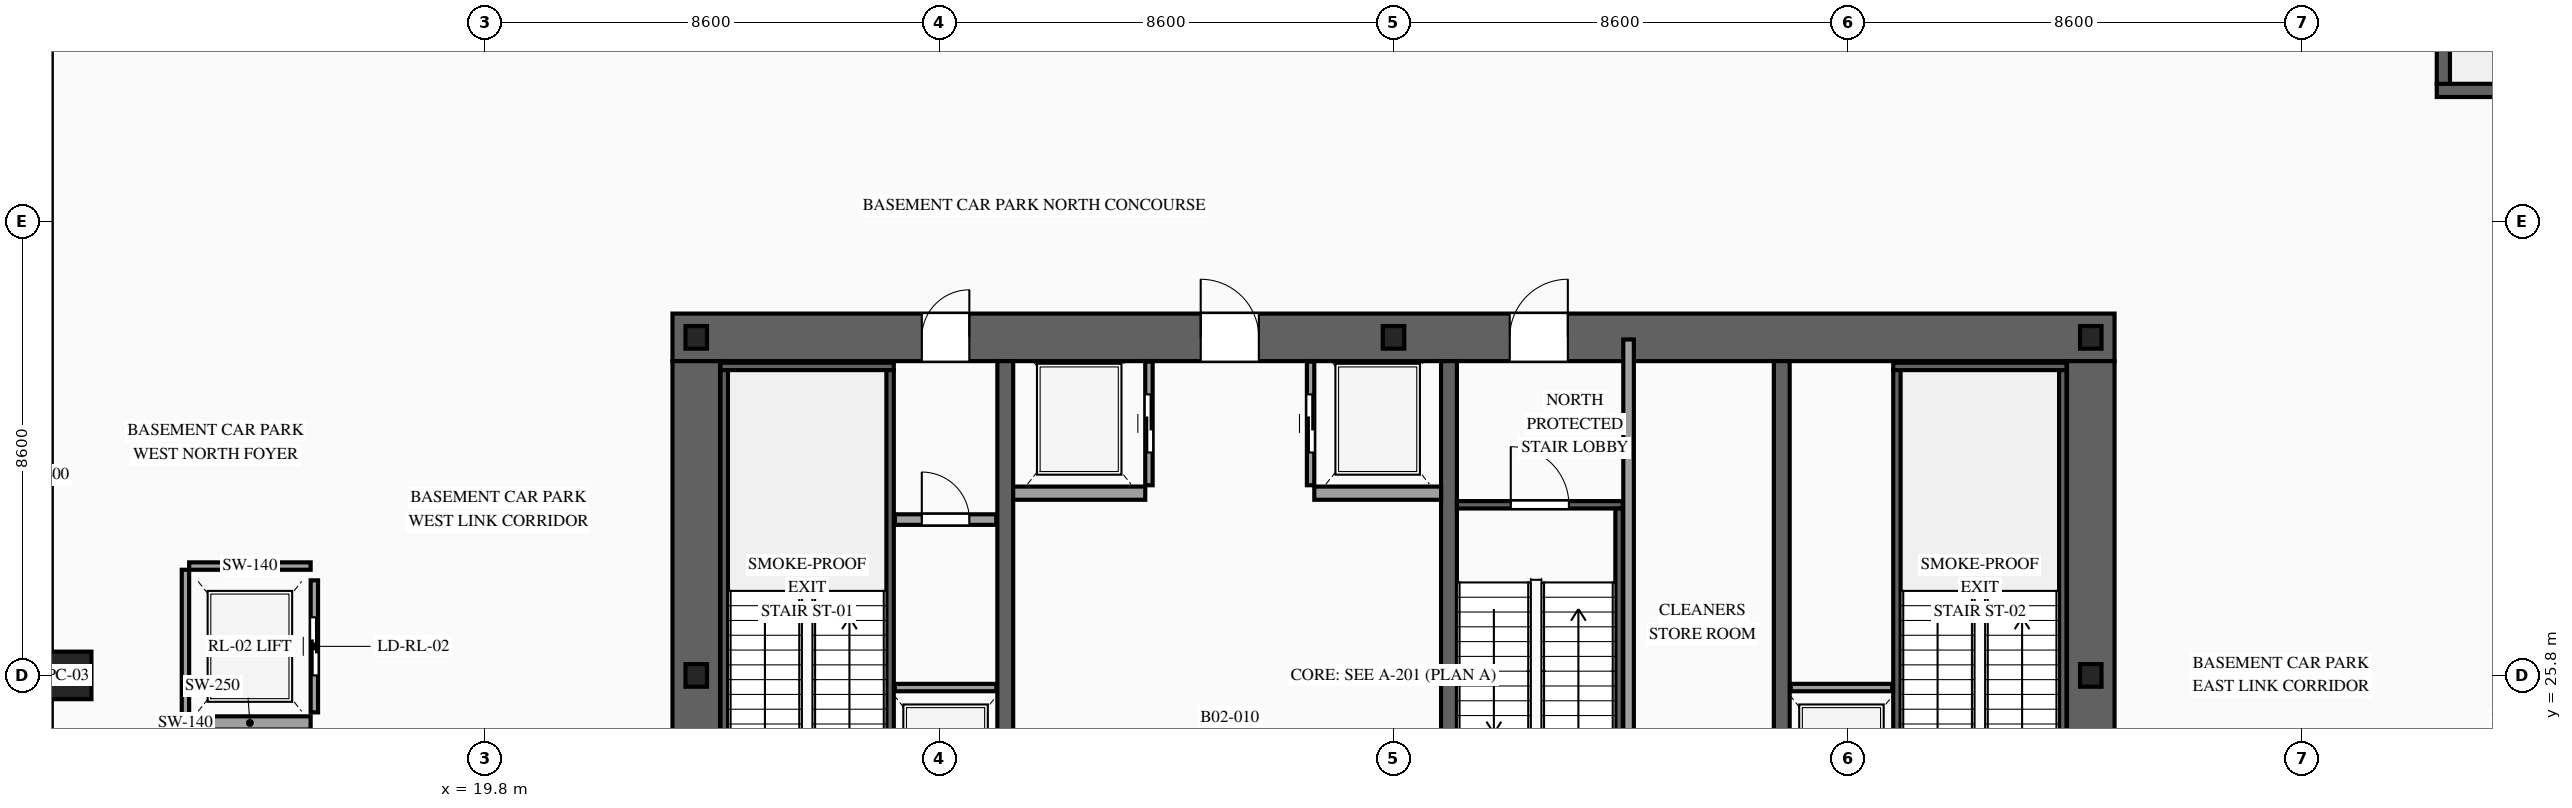
"""IFC4 building model, lengths in metres.
Left out: names, types, materials, properties, quantities, classifications, styles, units other than length and angle.
Written with IfcOpenShell. Run it as: python <this file> out.ifc"""

import sys

from ifc_helpers import new_model, si_unit, direction, frame, frame_2d, origin, origin_2d, place, context, subcontext, project, spatial, rectangle, i_section, extrude, source, transform, mapped, element, fill, save


model = new_model("IFC4")
c1 = context("Model", 3, precision=1e-05, world=origin(), true_north=direction((0.0, 1.0)))
c2 = subcontext(c1, "Body", "Model", "MODEL_VIEW")
j1 = project(units=[si_unit("LENGTHUNIT", "METRE"), si_unit("PLANEANGLEUNIT", "RADIAN")], contexts=[c1])
p1 = place(None, origin())
s1 = spatial("IfcSite", under=j1, at=p1, CompositionType="ELEMENT")
p2 = place(p1, origin())
s2 = spatial("IfcBuilding", under=s1, at=p2, CompositionType="ELEMENT")
p3 = place(p2, frame((0.0, 0.0, -9.0)))
s3 = spatial("IfcBuildingStorey", under=s2, at=p3, CompositionType="ELEMENT", Elevation=-9.0)
p4 = place(p3, frame((23.35, 32.2, 0.0), z_axis=(0.0, 0.0, 1.0), x_axis=(1.0, 0.0, 0.0)))
e1 = element("IfcWall", 1, at=p4, inside=s3, PredefinedType="SHEAR", context=c2, shape_type="SweptSolid", body=[
    extrude(rectangle(XDim=27.3, YDim=0.9, at=frame_2d((13.65, 0.0))), origin(), (0.0, 0.0, 1.0), 4.5),
])
p5 = place(p4, frame((4.72, 0.0, 0.0)))
e2 = element("IfcOpeningElement", 2, at=p5, cuts=e1, PredefinedType="OPENING", context=c2, shape_type="SweptSolid", body=[
    extrude(rectangle(XDim=0.9, YDim=2.15, at=frame_2d((0.45, 1.075))), frame((0.0, 0.465, 0.0), z_axis=(0.0, -1.0, 0.0), x_axis=(1.0, 0.0, 0.0)), (0.0, 0.0, 1.0), 0.93),
])
p6 = place(p4, frame((10.0, 0.0, 0.0)))
e3 = element("IfcOpeningElement", 3, at=p6, cuts=e1, PredefinedType="OPENING", context=c2, shape_type="SweptSolid", body=[
    extrude(rectangle(XDim=1.1, YDim=2.2, at=frame_2d((0.55, 1.1))), frame((0.0, 0.465, 0.0), z_axis=(0.0, -1.0, 0.0), x_axis=(1.0, 0.0, 0.0)), (0.0, 0.0, 1.0), 0.93),
])
p7 = place(p4, frame((15.85, 0.0, 0.0)))
e4 = element("IfcOpeningElement", 4, at=p7, cuts=e1, PredefinedType="OPENING", context=c2, shape_type="SweptSolid", body=[
    extrude(rectangle(XDim=1.1, YDim=2.2, at=frame_2d((0.55, 1.1))), frame((0.0, 0.465, 0.0), z_axis=(0.0, -1.0, 0.0), x_axis=(1.0, 0.0, 0.0)), (0.0, 0.0, 1.0), 0.93),
])
m1 = source(origin(), c2, "Body", "SweptSolid", [
    extrude(rectangle(XDim=11.9, YDim=0.9, at=frame_2d((5.95, 0.0))), origin(), (0.0, 0.0, 1.0), 4.5),
])
for number, where, z_axis, x_axis in (
    (5, (23.8, 19.85, 0.0), (0.0, 0.0, 1.0), (0.0, 1.0, 0.0)),
    (6, (50.2, 19.85, 0.0), (0.0, 0.0, 1.0), (0.0, 1.0, 0.0)),
):
    element("IfcWall", number, at=place(p3, frame(where, z_axis=z_axis, x_axis=x_axis)), inside=s3, PredefinedType="SHEAR", context=c2, shape_type="MappedRepresentation", body=[
        mapped(m1, transform((0.0, 0.0, 0.0), scale=1.0)),
    ])
m2 = source(origin(), c2, "Body", "SweptSolid", [
    extrude(rectangle(XDim=11.9, YDim=0.3, at=frame_2d((5.95, 0.0))), origin(), (0.0, 0.0, 1.0), 4.5),
])
for number, where, z_axis, x_axis in (
    (7, (29.65, 19.85, 0.0), (0.0, 0.0, 1.0), (0.0, 1.0, 0.0)),
    (8, (38.05, 19.85, 0.0), (0.0, 0.0, 1.0), (0.0, 1.0, 0.0)),
    (9, (44.35, 19.85, 0.0), (0.0, 0.0, 1.0), (0.0, 1.0, 0.0)),
):
    element("IfcWall", number, at=place(p3, frame(where, z_axis=z_axis, x_axis=x_axis)), inside=s3, PredefinedType="SOLIDWALL", context=c2, shape_type="MappedRepresentation", body=[
        mapped(m2, transform((0.0, 0.0, 0.0), scale=1.0)),
    ])
m3 = source(origin(), c2, "Body", "SweptSolid", [
    extrude(i_section(OverallWidth=0.407, OverallDepth=0.428, WebThickness=0.02, FlangeThickness=0.035, at=origin_2d()), origin(), (0.0, 0.0, 1.0), 4.5),
])
for number, where, z_axis, x_axis in (
    (10, (23.8, 25.8, 0.0), (0.0, 0.0, 1.0), (1.0, 0.0, 0.0)),
    (11, (50.2, 25.8, 0.0), (0.0, 0.0, 1.0), (1.0, 0.0, 0.0)),
    (12, (23.8, 32.2, 0.0), (0.0, 0.0, 1.0), (1.0, 0.0, 0.0)),
    (13, (37.0, 32.2, 0.0), (0.0, 0.0, 1.0), (1.0, 0.0, 0.0)),
    (14, (50.2, 32.2, 0.0), (0.0, 0.0, 1.0), (1.0, 0.0, 0.0)),
):
    element("IfcColumn", number, at=place(p3, frame(where, z_axis=z_axis, x_axis=x_axis)), inside=s3, PredefinedType="COLUMN", context=c2, shape_type="MappedRepresentation", body=[
        mapped(m3, transform((0.0, 0.0, 0.0), scale=1.0)),
    ])
m4 = source(origin(), c2, "Body", "SweptSolid", [
    extrude(rectangle(XDim=0.9, YDim=0.9, at=origin_2d()), origin(), (0.0, 0.0, 1.0), 4.5),
])
p8 = place(p3, frame((11.9, 25.8, 0.0), z_axis=(0.0, 0.0, 1.0), x_axis=(1.0, 0.0, 0.0)))
e15 = element("IfcColumn", 15, at=p8, inside=s3, PredefinedType="COLUMN", context=c2, shape_type="MappedRepresentation", body=[
    mapped(m4, transform((0.0, 0.0, 0.0), scale=1.0)),
])
m5 = source(origin(), c2, "Body", "SweptSolid", [
    extrude(rectangle(XDim=1.92, YDim=0.14, at=frame_2d((0.96, 0.0))), origin(), (0.0, 0.0, 1.0), 4.2),
])
for number, where, z_axis, x_axis in (
    (16, (27.56, 25.57, 0.0), (0.0, 0.0, 1.0), (1.0, 0.0, 0.0)),
    (17, (44.52, 25.57, 0.0), (0.0, 0.0, 1.0), (1.0, 0.0, 0.0)),
):
    element("IfcWall", number, at=place(p3, frame(where, z_axis=z_axis, x_axis=x_axis)), inside=s3, PredefinedType="SOLIDWALL", context=c2, shape_type="MappedRepresentation", body=[
        mapped(m5, transform((0.0, 0.0, 0.0), scale=1.0)),
    ])
p9 = place(p3, frame((32.37, 29.4, 0.0), z_axis=(0.0, 0.0, 1.0), x_axis=(0.0, 1.0, 0.0)))
e18 = element("IfcWall", 18, at=p9, inside=s3, PredefinedType="SOLIDWALL", context=c2, shape_type="SweptSolid", body=[
    extrude(rectangle(XDim=2.34, YDim=0.14, at=frame_2d((1.17, 0.0))), origin(), (0.0, 0.0, 1.0), 4.2),
])
p10 = place(p9, frame((0.62, 0.0, 0.0)))
e19 = element("IfcOpeningElement", 19, at=p10, cuts=e18, PredefinedType="OPENING", context=c2, shape_type="SweptSolid", body=[
    extrude(rectangle(XDim=1.1, YDim=2.2, at=frame_2d((0.55, 1.1))), frame((0.0, 0.085, 0.0), z_axis=(0.0, -1.0, 0.0), x_axis=(1.0, 0.0, 0.0)), (0.0, 0.0, 1.0), 0.17),
])
m6 = source(origin(), c2, "Body", "SweptSolid", [
    extrude(rectangle(XDim=2.5, YDim=0.25, at=frame_2d((1.25, 0.0))), origin(), (0.0, 0.0, 1.0), 4.2),
])
p11 = place(p3, frame((29.8, 29.25, 0.0), z_axis=(0.0, 0.0, 1.0), x_axis=(1.0, 0.0, 0.0)))
e20 = element("IfcWall", 20, at=p11, inside=s3, PredefinedType="SOLIDWALL", context=c2, shape_type="MappedRepresentation", body=[
    mapped(m6, transform((0.0, 0.0, 0.0), scale=1.0)),
])
p12 = place(p3, frame((35.43, 29.4, 0.0), z_axis=(0.0, 0.0, 1.0), x_axis=(0.0, 1.0, 0.0)))
e21 = element("IfcWall", 21, at=p12, inside=s3, PredefinedType="SOLIDWALL", context=c2, shape_type="SweptSolid", body=[
    extrude(rectangle(XDim=2.34, YDim=0.14, at=frame_2d((1.17, 0.0))), origin(), (0.0, 0.0, 1.0), 4.2),
])
p13 = place(p12, frame((0.62, 0.0, 0.0)))
e22 = element("IfcOpeningElement", 22, at=p13, cuts=e21, PredefinedType="OPENING", context=c2, shape_type="SweptSolid", body=[
    extrude(rectangle(XDim=1.1, YDim=2.2, at=frame_2d((0.55, 1.1))), frame((0.0, 0.085, 0.0), z_axis=(0.0, -1.0, 0.0), x_axis=(1.0, 0.0, 0.0)), (0.0, 0.0, 1.0), 0.17),
])
m7 = source(origin(), c2, "Body", "SweptSolid", [
    extrude(rectangle(XDim=2.4, YDim=0.25, at=frame_2d((1.2, 0.0))), origin(), (0.0, 0.0, 1.0), 4.2),
])
p14 = place(p3, frame((35.5, 29.25, 0.0), z_axis=(0.0, 0.0, 1.0), x_axis=(1.0, 0.0, 0.0)))
e23 = element("IfcWall", 23, at=p14, inside=s3, PredefinedType="SOLIDWALL", context=c2, shape_type="MappedRepresentation", body=[
    mapped(m7, transform((0.0, 0.0, 0.0), scale=1.0)),
])
m8 = source(origin(), c2, "Body", "SweptSolid", [
    extrude(rectangle(XDim=2.3, YDim=0.25, at=frame_2d((1.15, 0.0))), origin(), (0.0, 0.0, 1.0), 4.2),
])
p15 = place(p3, frame((14.2, 24.9, 0.0), z_axis=(0.0, 0.0, 1.0), x_axis=(1.0, 0.0, 0.0)))
e24 = element("IfcWall", 24, at=p15, inside=s3, PredefinedType="SOLIDWALL", context=c2, shape_type="MappedRepresentation", body=[
    mapped(m8, transform((0.0, 0.0, 0.0), scale=1.0)),
])
m9 = source(origin(), c2, "Body", "SweptSolid", [
    extrude(rectangle(XDim=5.8, YDim=0.14, at=frame_2d((2.9, 0.0))), origin(), (0.0, 0.0, 1.0), 4.2),
])
p16 = place(p3, frame((14.13, 22.0, 0.0), z_axis=(0.0, 0.0, 1.0), x_axis=(0.0, 1.0, 0.0)))
e25 = element("IfcWall", 25, at=p16, inside=s3, PredefinedType="SOLIDWALL", context=c2, shape_type="MappedRepresentation", body=[
    mapped(m9, transform((0.0, 0.0, 0.0), scale=1.0)),
])
p17 = place(p3, frame((16.57, 25.1, 0.0), z_axis=(0.0, 0.0, 1.0), x_axis=(0.0, 1.0, 0.0)))
e26 = element("IfcWall", 26, at=p17, inside=s3, PredefinedType="SOLIDWALL", context=c2, shape_type="SweptSolid", body=[
    extrude(rectangle(XDim=2.5, YDim=0.14, at=frame_2d((1.25, 0.0))), origin(), (0.0, 0.0, 1.0), 4.2),
])
p18 = place(p17, frame((0.7, 0.0, 0.0)))
e27 = element("IfcOpeningElement", 27, at=p18, cuts=e26, PredefinedType="OPENING", context=c2, shape_type="SweptSolid", body=[
    extrude(rectangle(XDim=1.1, YDim=2.2, at=frame_2d((0.55, 1.1))), frame((0.0, 0.085, 0.0), z_axis=(0.0, -1.0, 0.0), x_axis=(1.0, 0.0, 0.0)), (0.0, 0.0, 1.0), 0.17),
])
m10 = source(origin(), c2, "Body", "SweptSolid", [
    extrude(rectangle(XDim=2.3, YDim=0.14, at=frame_2d((1.15, 0.0))), origin(), (0.0, 0.0, 1.0), 4.2),
])
p19 = place(p3, frame((14.2, 27.87, 0.0), z_axis=(0.0, 0.0, 1.0), x_axis=(1.0, 0.0, 0.0)))
e28 = element("IfcWall", 28, at=p19, inside=s3, PredefinedType="SOLIDWALL", context=c2, shape_type="MappedRepresentation", body=[
    mapped(m10, transform((0.0, 0.0, 0.0), scale=1.0)),
])
m11 = source(origin(), c2, "Body", "SweptSolid", [
    extrude(rectangle(XDim=3.28, YDim=0.14, at=frame_2d((1.64, 0.0))), origin(), (0.0, 0.0, 1.0), 4.2),
])
p20 = place(p3, frame((24.26, 31.65, 0.0), z_axis=(0.0, 0.0, 1.0), x_axis=(1.0, 0.0, 0.0)))
e29 = element("IfcWall", 29, at=p20, inside=s3, PredefinedType="SOLIDWALL", context=c2, shape_type="MappedRepresentation", body=[
    mapped(m11, transform((0.0, 0.0, 0.0), scale=1.0)),
])
m12 = source(origin(), c2, "Body", "SweptSolid", [
    extrude(rectangle(XDim=8.94, YDim=0.14, at=frame_2d((4.47, 0.0))), origin(), (0.0, 0.0, 1.0), 4.2),
])
for number, where, z_axis, x_axis in (
    (30, (24.33, 22.64, 0.0), (0.0, 0.0, 1.0), (0.0, 1.0, 0.0)),
    (31, (27.47, 22.64, 0.0), (0.0, 0.0, 1.0), (0.0, 1.0, 0.0)),
):
    element("IfcWall", number, at=place(p3, frame(where, z_axis=z_axis, x_axis=x_axis)), inside=s3, PredefinedType="SOLIDWALL", context=c2, shape_type="MappedRepresentation", body=[
        mapped(m12, transform((0.0, 0.0, 0.0), scale=1.0)),
    ])
p21 = place(p3, frame((46.46, 31.65, 0.0), z_axis=(0.0, 0.0, 1.0), x_axis=(1.0, 0.0, 0.0)))
e32 = element("IfcWall", 32, at=p21, inside=s3, PredefinedType="SOLIDWALL", context=c2, shape_type="MappedRepresentation", body=[
    mapped(m11, transform((0.0, 0.0, 0.0), scale=1.0)),
])
for number, where, z_axis, x_axis in (
    (33, (46.53, 22.64, 0.0), (0.0, 0.0, 1.0), (0.0, 1.0, 0.0)),
    (34, (49.67, 22.64, 0.0), (0.0, 0.0, 1.0), (0.0, 1.0, 0.0)),
):
    element("IfcWall", number, at=place(p3, frame(where, z_axis=z_axis, x_axis=x_axis)), inside=s3, PredefinedType="SOLIDWALL", context=c2, shape_type="MappedRepresentation", body=[
        mapped(m12, transform((0.0, 0.0, 0.0), scale=1.0)),
    ])
p22 = place(p3, frame((38.2, 29.03, 0.0), z_axis=(0.0, 0.0, 1.0), x_axis=(1.0, 0.0, 0.0)))
e35 = element("IfcWall", 35, at=p22, inside=s3, PredefinedType="SOLIDWALL", context=c2, shape_type="SweptSolid", body=[
    extrude(rectangle(XDim=3.14, YDim=0.14, at=frame_2d((1.57, 0.0))), origin(), (0.0, 0.0, 1.0), 4.2),
])
p23 = place(p22, frame((1.02, 0.0, 0.0)))
e36 = element("IfcOpeningElement", 36, at=p23, cuts=e35, PredefinedType="OPENING", context=c2, shape_type="SweptSolid", body=[
    extrude(rectangle(XDim=1.1, YDim=2.2, at=frame_2d((0.55, 1.1))), frame((0.0, 0.085, 0.0), z_axis=(0.0, -1.0, 0.0), x_axis=(1.0, 0.0, 0.0)), (0.0, 0.0, 1.0), 0.17),
])
m13 = source(origin(), c2, "Body", "SweptSolid", [
    extrude(rectangle(XDim=8.94, YDim=0.14, at=frame_2d((4.47, 0.0))), origin(), (0.0, 0.0, 1.0), 4.2),
])
p24 = place(p3, frame((41.27, 20.02, 0.0), z_axis=(0.0, 0.0, 1.0), x_axis=(0.0, 1.0, 0.0)))
e37 = element("IfcWall", 37, at=p24, inside=s3, PredefinedType="SOLIDWALL", context=c2, shape_type="MappedRepresentation", body=[
    mapped(m13, transform((0.0, 0.0, 0.0), scale=1.0)),
])
m14 = source(origin(), c2, "Body", "SweptSolid", [
    extrude(rectangle(XDim=4.3, YDim=0.25, at=frame_2d((2.15, 0.0))), origin(), (0.0, 0.0, 1.0), 4.2),
])
p25 = place(p3, frame((56.75, 36.875, 0.0), z_axis=(0.0, 0.0, 1.0), x_axis=(1.0, 0.0, 0.0)))
e38 = element("IfcWall", 38, at=p25, inside=s3, PredefinedType="SOLIDWALL", context=c2, shape_type="MappedRepresentation", body=[
    mapped(m14, transform((0.0, 0.0, 0.0), scale=1.0)),
])
p26 = place(p3, frame((56.875, 37.0, 0.0), z_axis=(0.0, 0.0, 1.0), x_axis=(0.0, 1.0, 0.0)))
e39 = element("IfcWall", 39, at=p26, inside=s3, PredefinedType="SOLIDWALL", context=c2, shape_type="SweptSolid", body=[
    extrude(rectangle(XDim=9.6, YDim=0.25, at=frame_2d((4.8, 0.0))), origin(), (0.0, 0.0, 1.0), 4.2),
])
p27 = place(p26, frame((8.15, 0.0, 0.0)))
e40 = element("IfcOpeningElement", 40, at=p27, cuts=e39, PredefinedType="OPENING", context=c2, shape_type="SweptSolid", body=[
    extrude(rectangle(XDim=1.1, YDim=2.2, at=frame_2d((0.55, 1.1))), frame((0.0, 0.14, 0.0), z_axis=(0.0, -1.0, 0.0), x_axis=(1.0, 0.0, 0.0)), (0.0, 0.0, 1.0), 0.28),
])
p28 = place(p3, frame((27.56, 28.75, 0.0), z_axis=(0.0, 0.0, 1.0), x_axis=(1.0, 0.0, 0.0)))
e41 = element("IfcWall", 41, at=p28, inside=s3, PredefinedType="PARTITIONING", context=c2, shape_type="SweptSolid", body=[
    extrude(rectangle(XDim=1.92, YDim=0.2, at=frame_2d((0.96, 0.0))), origin(), (0.0, 0.0, 1.0), 4.2),
])
p29 = place(p28, frame((0.51, 0.0, 0.0)))
e42 = element("IfcOpeningElement", 42, at=p29, cuts=e41, PredefinedType="OPENING", context=c2, shape_type="SweptSolid", body=[
    extrude(rectangle(XDim=0.9, YDim=2.15, at=frame_2d((0.45, 1.075))), frame((0.0, 0.115, 0.0), z_axis=(0.0, -1.0, 0.0), x_axis=(1.0, 0.0, 0.0)), (0.0, 0.0, 1.0), 0.23),
])
m15 = source(origin(), c2, "Body", "SweptSolid", [
    extrude(rectangle(XDim=12.72, YDim=0.2, at=frame_2d((6.36, 0.0))), origin(), (0.0, 0.0, 1.0), 4.2),
])
p30 = place(p3, frame((41.45, 19.44, 0.0), z_axis=(0.0, 0.0, 1.0), x_axis=(0.0, 1.0, 0.0)))
e43 = element("IfcWall", 43, at=p30, inside=s3, PredefinedType="PARTITIONING", context=c2, shape_type="MappedRepresentation", body=[
    mapped(m15, transform((0.0, 0.0, 0.0), scale=1.0)),
])
m16 = source(origin(), c2, "Body", "SweptSolid", [
    extrude(rectangle(XDim=1.1, YDim=2.2, at=frame_2d((0.55, 1.1))), frame((0.0, 0.025, 0.0), z_axis=(0.0, -1.0, 0.0), x_axis=(1.0, 0.0, 0.0)), (0.0, 0.0, 1.0), 0.05),
])
p31 = place(p10, origin())
e44 = element("IfcDoor", 44, at=p31, inside=s3, OperationType="SLIDING_TO_LEFT", PredefinedType="DOOR", context=c2, shape_type="MappedRepresentation", body=[
    mapped(m16, transform((0.0, 0.0, 0.0), scale=1.0)),
])
fill(e19, e44)
p32 = place(p13, origin())
e45 = element("IfcDoor", 45, at=p32, inside=s3, OperationType="SLIDING_TO_RIGHT", PredefinedType="DOOR", context=c2, shape_type="MappedRepresentation", body=[
    mapped(m16, transform((0.0, 0.0, 0.0), scale=1.0)),
])
fill(e22, e45)
p33 = place(p18, origin())
e46 = element("IfcDoor", 46, at=p33, inside=s3, OperationType="SLIDING_TO_LEFT", PredefinedType="DOOR", context=c2, shape_type="MappedRepresentation", body=[
    mapped(m16, transform((0.0, 0.0, 0.0), scale=1.0)),
])
fill(e27, e46)
m17 = source(origin(), c2, "Body", "SweptSolid", [
    extrude(rectangle(XDim=1.1, YDim=2.2, at=frame_2d((0.55, 1.1))), frame((0.0, 0.025, 0.0), z_axis=(0.0, -1.0, 0.0), x_axis=(1.0, 0.0, 0.0)), (0.0, 0.0, 1.0), 0.05),
])
p34 = place(p23, origin())
e47 = element("IfcDoor", 47, at=p34, inside=s3, OperationType="SINGLE_SWING_LEFT", PredefinedType="DOOR", context=c2, shape_type="MappedRepresentation", body=[
    mapped(m17, transform((0.0, 0.0, 0.0), scale=1.0)),
])
fill(e36, e47)
m18 = source(origin(), c2, "Body", "SweptSolid", [
    extrude(rectangle(XDim=0.9, YDim=2.15, at=frame_2d((0.45, 1.075))), frame((0.0, 0.025, 0.0), z_axis=(0.0, -1.0, 0.0), x_axis=(1.0, 0.0, 0.0)), (0.0, 0.0, 1.0), 0.05),
])
p35 = place(p5, origin())
e48 = element("IfcDoor", 48, at=p35, inside=s3, OperationType="SINGLE_SWING_RIGHT", PredefinedType="DOOR", context=c2, shape_type="MappedRepresentation", body=[
    mapped(m18, transform((0.0, 0.0, 0.0), scale=1.0)),
])
fill(e2, e48)
p36 = place(p6, origin())
e49 = element("IfcDoor", 49, at=p36, inside=s3, OperationType="SINGLE_SWING_LEFT", PredefinedType="DOOR", context=c2, shape_type="MappedRepresentation", body=[
    mapped(m17, transform((0.0, 0.0, 0.0), scale=1.0)),
])
fill(e3, e49)
p37 = place(p7, origin())
e50 = element("IfcDoor", 50, at=p37, inside=s3, OperationType="SINGLE_SWING_RIGHT", PredefinedType="DOOR", context=c2, shape_type="MappedRepresentation", body=[
    mapped(m17, transform((0.0, 0.0, 0.0), scale=1.0)),
])
fill(e4, e50)
p38 = place(p29, origin())
e51 = element("IfcDoor", 51, at=p38, inside=s3, OperationType="SINGLE_SWING_LEFT", PredefinedType="DOOR", context=c2, shape_type="MappedRepresentation", body=[
    mapped(m18, transform((0.0, 0.0, 0.0), scale=1.0)),
])
fill(e42, e51)
save(model, sys.argv[1])
